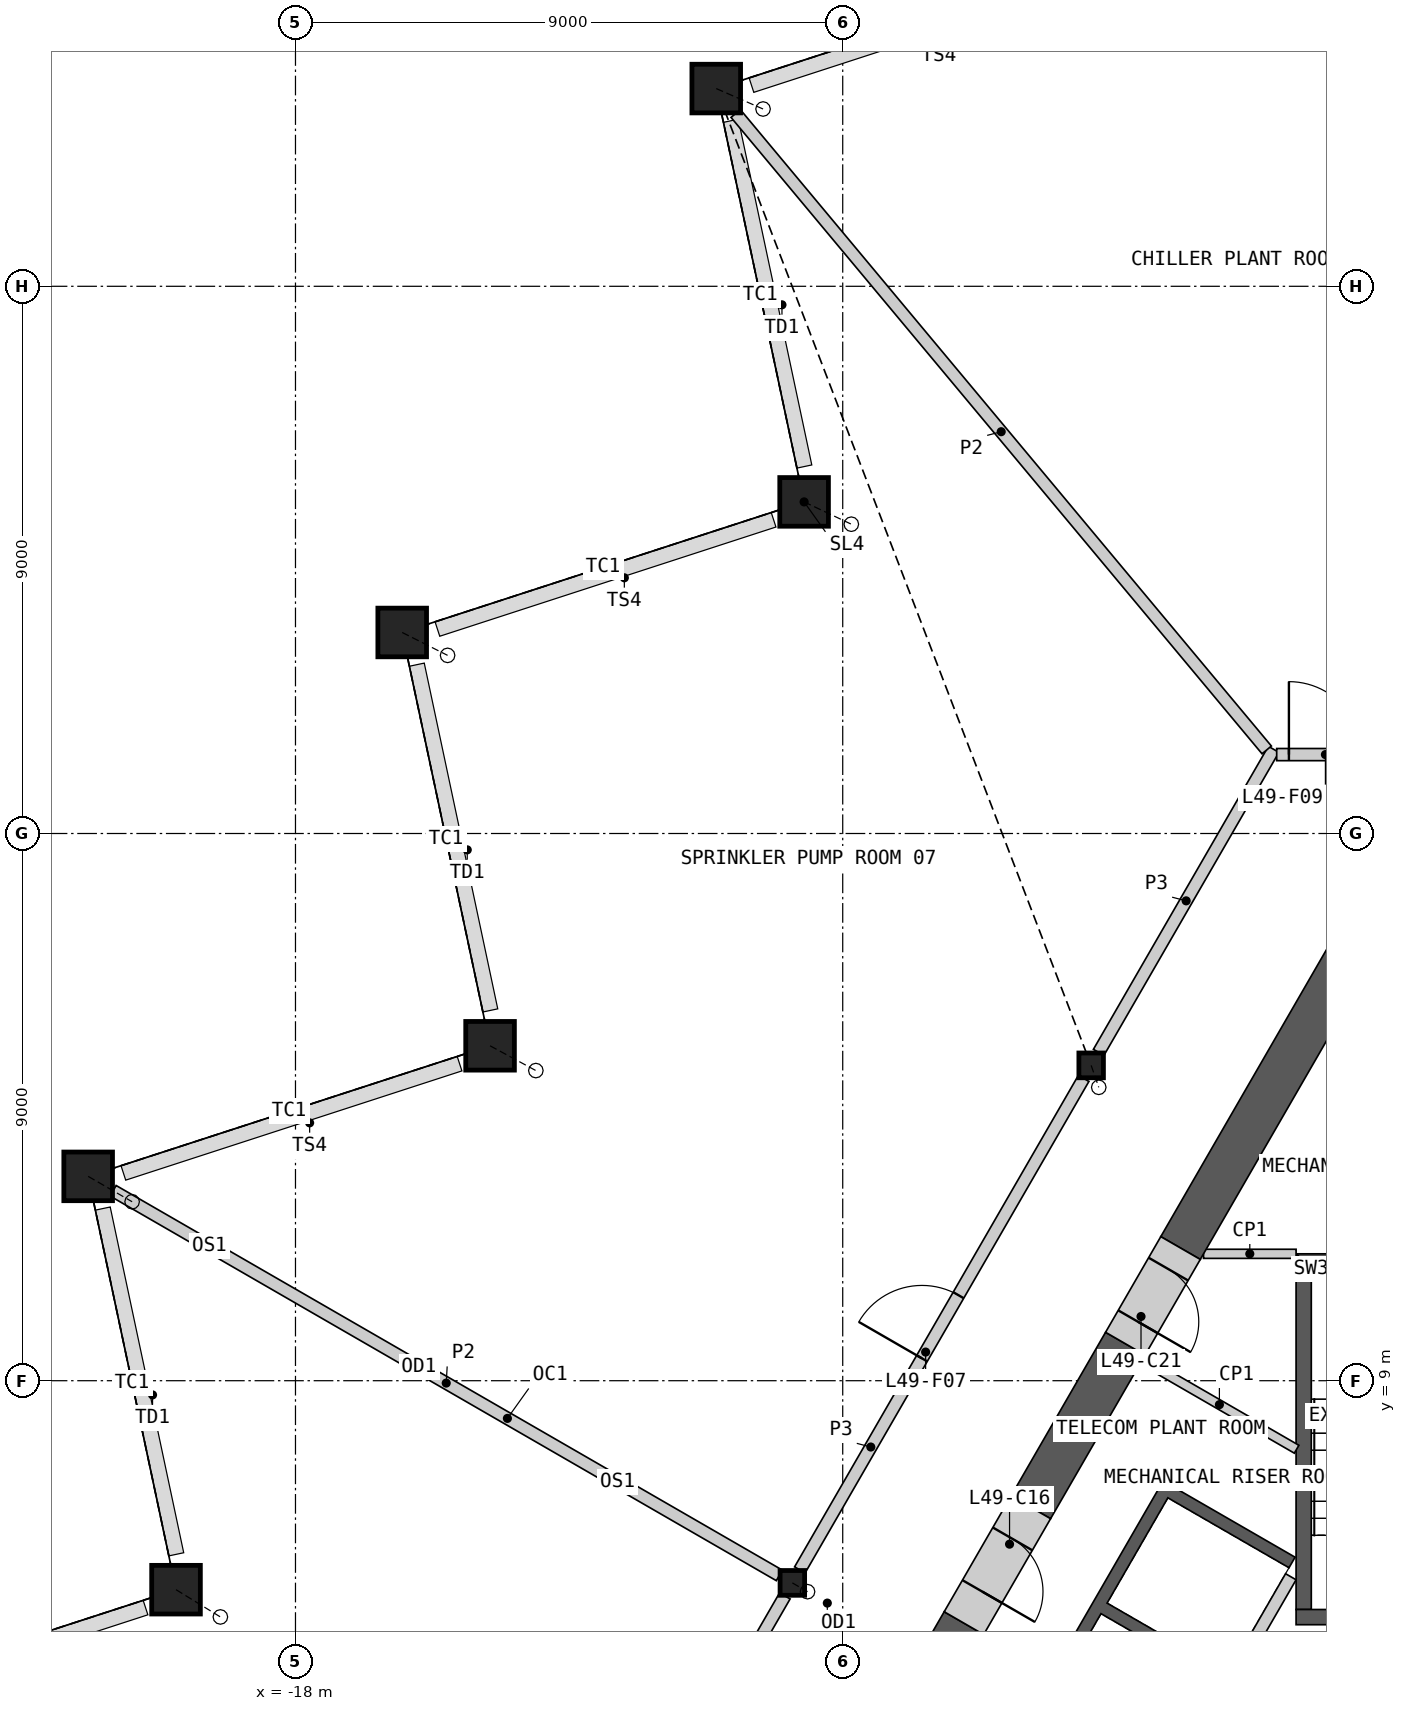
"""IFC4 building model, lengths in metres.
Left out: names, types, materials, properties, quantities, classifications, styles, units other than length and angle.
Written with IfcOpenShell. Run it as: python <this file> out.ifc"""

import sys

from ifc_helpers import new_model, si_unit, direction, frame, frame_2d, origin, origin_2d, place, context, subcontext, project, spatial, polyline, rectangle, hollow_rectangle, i_section, outline, extrude, element, fill, save


model = new_model("IFC4")
c1 = context("Model", 3, precision=1e-05, world=origin(), true_north=direction((0.0, 1.0)))
c2 = subcontext(c1, "Body", "Model", "MODEL_VIEW")
j1 = project(units=[si_unit("LENGTHUNIT", "METRE"), si_unit("PLANEANGLEUNIT", "RADIAN")], contexts=[c1])
p1 = place(None, origin())
s1 = spatial("IfcSite", under=j1, at=p1, CompositionType="ELEMENT")
p2 = place(p1, origin())
s2 = spatial("IfcBuilding", under=s1, at=p2, CompositionType="ELEMENT")
p3 = place(p2, frame((0.0, 0.0, 226.0)))
s3 = spatial("IfcBuildingStorey", under=s2, at=p3, CompositionType="ELEMENT", Elevation=226.0)
p4 = place(p3, frame((-11.08, 30.252, 0.0), z_axis=(0.151827964883, -0.066259207003, 0.986183546084), x_axis=(0.399979973786, 0.916523878887, 0.0)))
e1 = element("IfcColumn", 1, at=p4, inside=s3, PredefinedType="COLUMN", context=c2, shape_type="SweptSolid", body=[
    extrude(hollow_rectangle(XDim=0.8, YDim=0.8, WallThickness=0.05, at=origin_2d()), frame((0.0, 0.0, 0.067)), (0.0, 0.0, 1.0), 4.936),
])
p5 = place(p3, frame((-9.635, 23.454, 0.0), z_axis=(0.153080457926, -0.072281310218, 0.985566733202), x_axis=(0.426974022071, 0.90426389095, 0.0)))
e2 = element("IfcColumn", 2, at=p5, inside=s3, PredefinedType="COLUMN", context=c2, shape_type="SweptSolid", body=[
    extrude(hollow_rectangle(XDim=0.8, YDim=0.8, WallThickness=0.05, at=origin_2d()), frame((0.0, 0.0, 0.069)), (0.0, 0.0, 1.0), 4.936),
])
p6 = place(p3, frame((-16.245, 21.306, 0.0), z_axis=(0.147223782271, -0.074310204791, 0.986307838049), x_axis=(0.450597903076, 0.892727018603, 0.0)))
e3 = element("IfcColumn", 3, at=p6, inside=s3, PredefinedType="COLUMN", context=c2, shape_type="SweptSolid", body=[
    extrude(hollow_rectangle(XDim=0.8, YDim=0.8, WallThickness=0.05, at=origin_2d()), frame((0.0, 0.0, 0.067)), (0.0, 0.0, 1.0), 4.936),
])
p7 = place(p3, frame((-14.8, 14.508, 0.0), z_axis=(0.14842592214, -0.080325182896, 0.98565592913), x_axis=(0.475952391662, 0.879471046067, 0.0)))
e4 = element("IfcColumn", 4, at=p7, inside=s3, PredefinedType="COLUMN", context=c2, shape_type="SweptSolid", body=[
    extrude(hollow_rectangle(XDim=0.8, YDim=0.8, WallThickness=0.05, at=origin_2d()), frame((0.0, 0.0, 0.069)), (0.0, 0.0, 1.0), 4.936),
])
p8 = place(p3, frame((-21.409, 12.361, 0.0), z_axis=(0.142558983537, -0.082356710084, 0.986354048259), x_axis=(0.500228859883, 0.865893231143, 0.0)))
e5 = element("IfcColumn", 5, at=p8, inside=s3, PredefinedType="COLUMN", context=c2, shape_type="SweptSolid", body=[
    extrude(hollow_rectangle(XDim=0.8, YDim=0.8, WallThickness=0.05, at=origin_2d()), frame((0.0, 0.0, 0.067)), (0.0, 0.0, 1.0), 4.936),
])
p9 = place(p3, frame((-19.965, 5.563, 0.0), z_axis=(0.143805256431, -0.088362266, 0.985653163222), x_axis=(0.52352457136, 0.852010576919, 0.0)))
e6 = element("IfcColumn", 6, at=p9, inside=s3, PredefinedType="COLUMN", context=c2, shape_type="SweptSolid", body=[
    extrude(hollow_rectangle(XDim=0.8, YDim=0.8, WallThickness=0.05, at=origin_2d()), frame((0.0, 0.0, 0.069)), (0.0, 0.0, 1.0), 4.936),
])
p10 = place(p3, frame((-4.914, 14.186, 0.0), z_axis=(0.024927314899, -0.072006833468, 0.997092595954), x_axis=(0.944978476916, 0.327132508574, 0.0)))
e7 = element("IfcColumn", 7, at=p10, inside=s3, PredefinedType="COLUMN", context=c2, shape_type="SweptSolid", body=[
    extrude(i_section(OverallWidth=0.404, OverallDepth=0.407, WebThickness=0.027, FlangeThickness=0.044, at=origin_2d()), frame((0.0, 0.0, 0.016)), (0.0, 0.0, 1.0), 4.983),
])
p11 = place(p3, frame((-9.828, 5.675, 0.0), z_axis=(0.049916818753, -0.028858160841, 0.998336375055), x_axis=(0.500502949238, 0.865734831114, 0.0)))
e8 = element("IfcColumn", 8, at=p11, inside=s3, PredefinedType="COLUMN", context=c2, shape_type="SweptSolid", body=[
    extrude(i_section(OverallWidth=0.404, OverallDepth=0.407, WebThickness=0.027, FlangeThickness=0.044, at=origin_2d()), frame((0.0, 0.0, 0.012)), (0.0, 0.0, 1.0), 4.985),
])
p12 = place(p3, origin())
e9 = element("IfcWall", 9, at=p12, inside=s3, PredefinedType="SHEAR", context=c2, shape_type="SweptSolid", body=[
    extrude(outline(polyline([(-4.96, 0.208), (-7.131, 1.461), (-3.731, 7.35), (-1.561, 6.097), (-1.66, 5.924), (-3.652, 7.074), (-4.652, 5.342), (-2.66, 4.192), (-2.76, 4.019), (-4.752, 5.169), (-5.752, 3.437), (-3.76, 2.287), (-3.861, 2.113), (-5.852, 3.263), (-6.852, 1.531), (-4.861, 0.381), (-4.96, 0.208)])), origin(), (0.0, 0.0, 1.0), 4.65),
])
p13 = place(p3, frame((-1.631, 5.776, 0.0), z_axis=(0.0, 0.0, 1.0), x_axis=(-0.499992876559, -0.866029516466, 0.0)))
e10 = element("IfcWall", 10, at=p13, inside=s3, PredefinedType="SOLIDWALL", context=c2, shape_type="SweptSolid", body=[
    extrude(rectangle(XDim=6.486, YDim=0.2, at=frame_2d((3.243, 0.0))), origin(), (0.0, 0.0, 1.0), 4.65),
])
p14 = place(p3, origin())
e11 = element("IfcWall", 11, at=p14, inside=s3, PredefinedType="SHEAR", context=c2, shape_type="SweptSolid", body=[
    extrude(outline(polyline([(1.544, 11.087), (-1.544, 11.087), (-1.294, 10.837), (1.294, 10.837), (1.544, 11.087)])), origin(), (0.0, 0.0, 1.0), 4.65),
])
p15 = place(p3, origin())
e12 = element("IfcWall", 12, at=p15, inside=s3, PredefinedType="SHEAR", context=c2, shape_type="SweptSolid", body=[
    extrude(outline(polyline([(-1.294, 10.837), (-1.544, 11.087), (-1.544, 5.237), (-1.294, 5.237), (-1.294, 10.837)])), origin(), (0.0, 0.0, 1.0), 4.65),
])
p16 = place(p3, frame((1.544, 5.112, 0.0), z_axis=(0.0, 0.0, 1.0), x_axis=(-1.0, 0.0, 0.0)))
e13 = element("IfcWall", 13, at=p16, inside=s3, PredefinedType="SHEAR", context=c2, shape_type="SweptSolid", body=[
    extrude(rectangle(XDim=3.088, YDim=0.25, at=frame_2d((1.544, 0.0))), origin(), (0.0, 0.0, 1.0), 4.65),
])
p17 = place(p16, frame((0.994, 0.0, 0.0)))
e14 = element("IfcOpeningElement", 14, at=p17, cuts=e13, PredefinedType="OPENING", context=c2, shape_type="SweptSolid", body=[
    extrude(rectangle(XDim=1.1, YDim=2.1, at=frame_2d((0.55, 1.05))), frame((0.0, 0.135, 0.0), z_axis=(0.0, -1.0, 0.0), x_axis=(1.0, 0.0, 0.0)), (0.0, 0.0, 1.0), 0.27),
])
p18 = place(p3, frame((-4.075, 9.339, 0.0), z_axis=(0.0, 0.0, 1.0), x_axis=(0.865995658863, -0.500051516177, 0.0)))
e15 = element("IfcWall", 15, at=p18, inside=s3, PredefinedType="PARTITIONING", context=c2, shape_type="SweptSolid", body=[
    extrude(rectangle(XDim=2.933, YDim=0.15, at=frame_2d((1.466, 0.0))), origin(), (0.0, 0.0, 1.0), 4.65),
])
p19 = place(p3, frame((-1.544, 11.087, 0.0), z_axis=(0.0, 0.0, 1.0), x_axis=(-1.0, 0.0, 0.0)))
e16 = element("IfcWall", 16, at=p19, inside=s3, PredefinedType="PARTITIONING", context=c2, shape_type="SweptSolid", body=[
    extrude(rectangle(XDim=1.522, YDim=0.15, at=frame_2d((0.761, 0.0))), origin(), (0.0, 0.0, 1.0), 4.65),
])
p20 = place(p3, frame((-0.325, 16.585, 0.0), z_axis=(0.0, 0.0, 1.0), x_axis=(-0.499985517215, -0.866033765263, 0.0)))
e17 = element("IfcWall", 17, at=p20, inside=s3, PredefinedType="SHEAR", context=c2, shape_type="SweptSolid", body=[
    extrude(rectangle(XDim=6.24, YDim=0.75, at=frame_2d((3.12, 0.0))), origin(), (0.0, 0.0, 1.0), 4.65),
])
p21 = place(p3, frame((-4.353, 9.609, 0.0), z_axis=(0.0, 0.0, 1.0), x_axis=(-0.500017123375, -0.866015517374, 0.0)))
e18 = element("IfcWall", 18, at=p21, inside=s3, PredefinedType="SHEAR", context=c2, shape_type="SweptSolid", body=[
    extrude(rectangle(XDim=3.108, YDim=0.75, at=frame_2d((1.554, 0.0))), origin(), (0.0, 0.0, 1.0), 4.65),
])
p22 = place(p3, frame((-7.006, 5.012, 0.0), z_axis=(0.0, 0.0, 1.0), x_axis=(-0.49996826437, -0.866043725583, 0.0)))
e19 = element("IfcWall", 19, at=p22, inside=s3, PredefinedType="SHEAR", context=c2, shape_type="SweptSolid", body=[
    extrude(rectangle(XDim=3.038, YDim=0.75, at=frame_2d((1.519, 0.0))), origin(), (0.0, 0.0, 1.0), 4.65),
])
p23 = place(p3, frame((-5.906, 6.918, 0.0), z_axis=(0.0, 0.0, 1.0), x_axis=(-0.499946605688, -0.86605622881, 0.0)))
e20 = element("IfcWall", 20, at=p23, inside=s3, PredefinedType="SHEAR", context=c2, shape_type="SweptSolid", body=[
    extrude(rectangle(XDim=2.2, YDim=0.75, at=frame_2d((1.1, 0.0))), origin(), (0.0, 0.0, 1.0), 4.65),
])
p24 = place(p23, frame((0.6, 0.0, 0.0)))
e21 = element("IfcOpeningElement", 21, at=p24, cuts=e20, PredefinedType="OPENING", context=c2, shape_type="SweptSolid", body=[
    extrude(rectangle(XDim=1.0, YDim=2.1, at=frame_2d((0.5, 1.05))), frame((0.0, 0.385, 0.0), z_axis=(0.0, -1.0, 0.0), x_axis=(1.0, 0.0, 0.0)), (0.0, 0.0, 1.0), 0.77),
])
p25 = place(p3, frame((-3.444, 11.182, 0.0), z_axis=(0.0, 0.0, 1.0), x_axis=(-0.500071537347, -0.865984097738, 0.0)))
e22 = element("IfcWall", 22, at=p25, inside=s3, PredefinedType="SHEAR", context=c2, shape_type="SweptSolid", body=[
    extrude(rectangle(XDim=1.816, YDim=0.75, at=frame_2d((0.908, 0.0))), origin(), (0.0, 0.0, 1.0), 4.65),
])
p26 = place(p25, frame((0.4, 0.0, 0.0)))
e23 = element("IfcOpeningElement", 23, at=p26, cuts=e22, PredefinedType="OPENING", context=c2, shape_type="SweptSolid", body=[
    extrude(rectangle(XDim=1.0, YDim=2.1, at=frame_2d((0.5, 1.05))), frame((0.0, 0.385, 0.0), z_axis=(0.0, -1.0, 0.0), x_axis=(1.0, 0.0, 0.0)), (0.0, 0.0, 1.0), 0.77),
])
p27 = place(p3, frame((-9.705, 5.888, 0.0), z_axis=(0.0, 0.0, 1.0), x_axis=(0.50000393355, 0.866023132736, 0.0)))
e24 = element("IfcWall", 24, at=p27, inside=s3, PredefinedType="PARTITIONING", context=c2, shape_type="SweptSolid", body=[
    extrude(rectangle(XDim=9.335, YDim=0.2, at=frame_2d((4.667, 0.0))), origin(), (0.0, 0.0, 1.0), 4.65),
])
p28 = place(p27, frame((4.017, 0.0, 0.0)))
e25 = element("IfcOpeningElement", 25, at=p28, cuts=e24, PredefinedType="OPENING", context=c2, shape_type="SweptSolid", body=[
    extrude(rectangle(XDim=1.2, YDim=2.1, at=frame_2d((0.6, 1.05))), frame((0.0, 0.11, 0.0), z_axis=(0.0, -1.0, 0.0), x_axis=(1.0, 0.0, 0.0)), (0.0, 0.0, 1.0), 0.22),
])
p29 = place(p3, frame((-14.619, -2.624, 0.0), z_axis=(0.0, 0.0, 1.0), x_axis=(0.50000393355, 0.866023132736, 0.0)))
e26 = element("IfcWall", 26, at=p29, inside=s3, PredefinedType="PARTITIONING", context=c2, shape_type="SweptSolid", body=[
    extrude(rectangle(XDim=9.335, YDim=0.2, at=frame_2d((4.667, 0.0))), origin(), (0.0, 0.0, 1.0), 4.65),
])
p30 = place(p29, frame((4.118, 0.0, 0.0)))
e27 = element("IfcOpeningElement", 27, at=p30, cuts=e26, PredefinedType="OPENING", context=c2, shape_type="SweptSolid", body=[
    extrude(rectangle(XDim=1.2, YDim=2.1, at=frame_2d((0.6, 1.05))), frame((0.0, 0.11, 0.0), z_axis=(0.0, -1.0, 0.0), x_axis=(1.0, 0.0, 0.0)), (0.0, 0.0, 1.0), 0.22),
])
p31 = place(p3, frame((-4.791, 14.4, 0.0), z_axis=(0.0, 0.0, 1.0), x_axis=(0.50000762079, 0.866021003874, 0.0)))
e28 = element("IfcWall", 28, at=p31, inside=s3, PredefinedType="PARTITIONING", context=c2, shape_type="SweptSolid", body=[
    extrude(rectangle(XDim=5.756, YDim=0.2, at=frame_2d((2.878, 0.0))), origin(), (0.0, 0.0, 1.0), 4.65),
])
p32 = place(p3, frame((-1.863, 19.298, 0.0), z_axis=(0.0, 0.0, 1.0), x_axis=(1.0, 0.0, 0.0)))
e29 = element("IfcWall", 29, at=p32, inside=s3, PredefinedType="PARTITIONING", context=c2, shape_type="SweptSolid", body=[
    extrude(rectangle(XDim=3.726, YDim=0.2, at=frame_2d((1.863, 0.0))), origin(), (0.0, 0.0, 1.0), 4.65),
])
p33 = place(p32, frame((0.201, 0.0, 0.0)))
e30 = element("IfcOpeningElement", 30, at=p33, cuts=e29, PredefinedType="OPENING", context=c2, shape_type="SweptSolid", body=[
    extrude(rectangle(XDim=1.2, YDim=2.1, at=frame_2d((0.6, 1.05))), frame((0.0, 0.11, 0.0), z_axis=(0.0, -1.0, 0.0), x_axis=(1.0, 0.0, 0.0)), (0.0, 0.0, 1.0), 0.22),
])
p34 = place(p3, frame((-10.76, 29.842, 0.0), z_axis=(0.0, 0.0, 1.0), x_axis=(0.640645811519, -0.767836534806, 0.0)))
e31 = element("IfcWall", 31, at=p34, inside=s3, PredefinedType="PARTITIONING", context=c2, shape_type="SweptSolid", body=[
    extrude(rectangle(XDim=13.632, YDim=0.2, at=frame_2d((6.816, 0.0))), origin(), (0.0, 0.0, 1.0), 4.65),
])
p35 = place(p3, frame((-21.0, 12.124, 0.0), z_axis=(0.0, 0.0, 1.0), x_axis=(0.866025883649, -0.499999168849, 0.0)))
e32 = element("IfcWall", 32, at=p35, inside=s3, PredefinedType="PARTITIONING", context=c2, shape_type="SweptSolid", body=[
    extrude(rectangle(XDim=12.652, YDim=0.2, at=frame_2d((6.326, 0.0))), origin(), (0.0, 0.0, 1.0), 4.65),
])
p36 = place(p24, origin())
e33 = element("IfcDoor", 33, at=p36, inside=s3, OperationType="SINGLE_SWING_RIGHT", PredefinedType="DOOR", context=c2, shape_type="SweptSolid", body=[
    extrude(rectangle(XDim=1.0, YDim=2.1, at=frame_2d((0.5, 1.05))), frame((0.0, 0.13, 0.0), z_axis=(0.0, -1.0, 0.0), x_axis=(1.0, 0.0, 0.0)), (0.0, 0.0, 1.0), 0.05),
])
fill(e21, e33)
p37 = place(p26, origin())
e34 = element("IfcDoor", 34, at=p37, inside=s3, OperationType="SINGLE_SWING_RIGHT", PredefinedType="DOOR", context=c2, shape_type="SweptSolid", body=[
    extrude(rectangle(XDim=1.0, YDim=2.1, at=frame_2d((0.5, 1.05))), frame((0.0, 0.13, 0.0), z_axis=(0.0, -1.0, 0.0), x_axis=(1.0, 0.0, 0.0)), (0.0, 0.0, 1.0), 0.05),
])
fill(e23, e34)
p38 = place(p28, origin())
e35 = element("IfcDoor", 35, at=p38, inside=s3, OperationType="SINGLE_SWING_LEFT", PredefinedType="DOOR", context=c2, shape_type="SweptSolid", body=[
    extrude(rectangle(XDim=1.2, YDim=2.1, at=frame_2d((0.6, 1.05))), frame((0.0, 0.025, 0.0), z_axis=(0.0, -1.0, 0.0), x_axis=(1.0, 0.0, 0.0)), (0.0, 0.0, 1.0), 0.05),
])
fill(e25, e35)
p39 = place(p33, origin())
e36 = element("IfcDoor", 36, at=p39, inside=s3, OperationType="SINGLE_SWING_LEFT", PredefinedType="DOOR", context=c2, shape_type="SweptSolid", body=[
    extrude(rectangle(XDim=1.2, YDim=2.1, at=frame_2d((0.6, 1.05))), frame((0.0, 0.025, 0.0), z_axis=(0.0, -1.0, 0.0), x_axis=(1.0, 0.0, 0.0)), (0.0, 0.0, 1.0), 0.05),
])
fill(e30, e36)
save(model, sys.argv[1])
